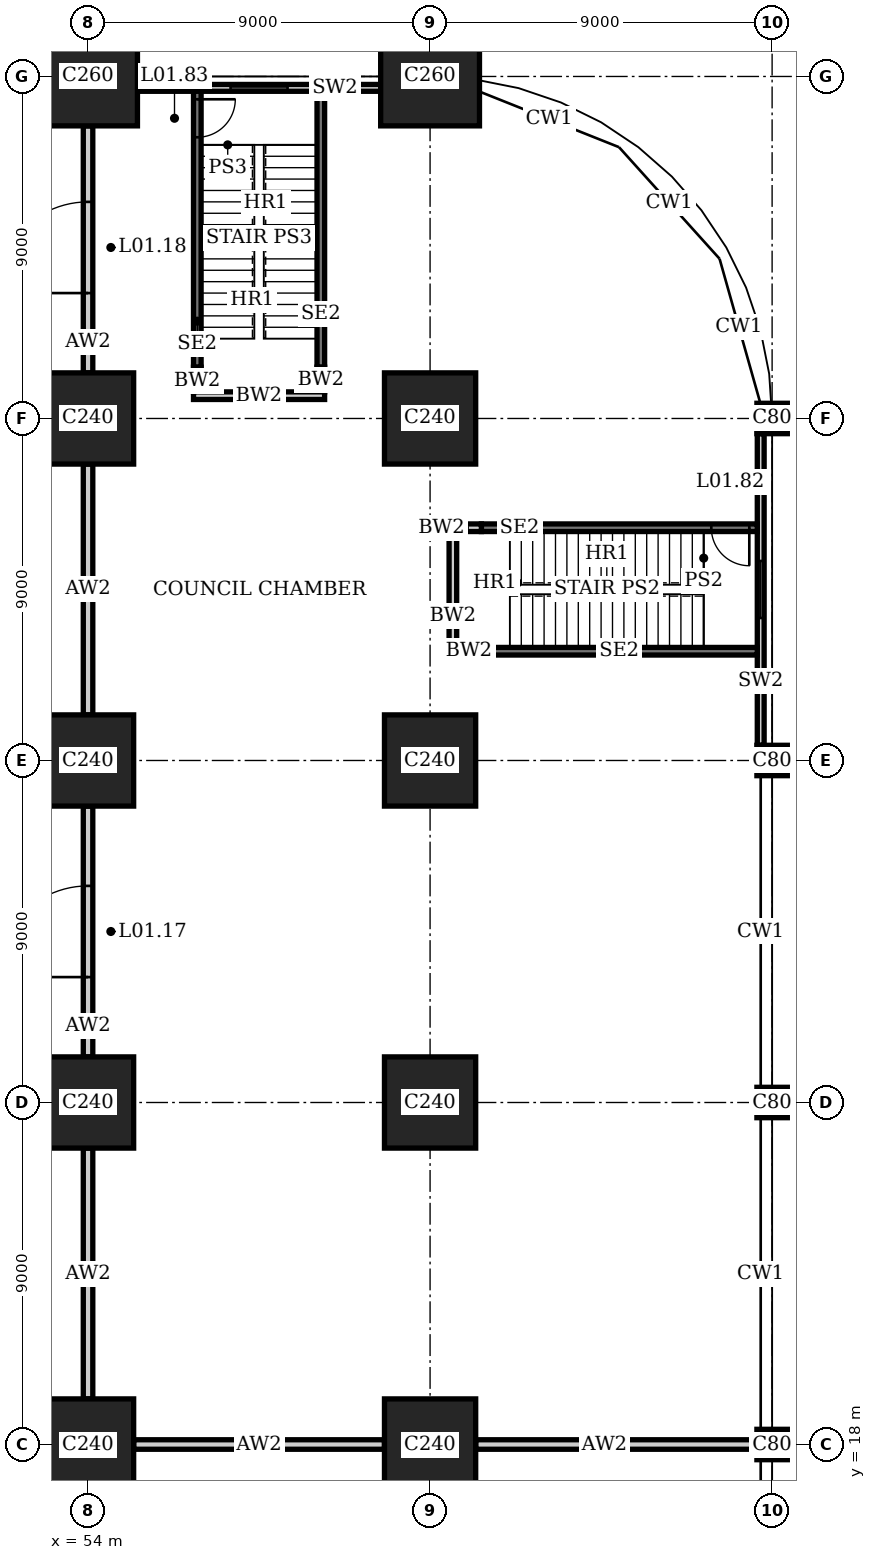
"""IFC4 building model, lengths in metres.
Left out: names, types, materials, properties, quantities, classifications, styles, units other than length and angle.
Written with IfcOpenShell. Run it as: python <this file> out.ifc"""

import sys

from ifc_helpers import new_model, si_unit, direction, frame, frame_2d, origin, origin_2d, place, context, subcontext, project, spatial, rectangle, extrude, element, fill, save


model = new_model("IFC4")
c1 = context("Model", 3, precision=1e-05, world=origin(), true_north=direction((0.0, 1.0)))
c2 = subcontext(c1, "Body", "Model", "MODEL_VIEW")
j1 = project(units=[si_unit("LENGTHUNIT", "METRE"), si_unit("PLANEANGLEUNIT", "RADIAN")], contexts=[c1])
p1 = place(None, origin())
s1 = spatial("IfcSite", under=j1, at=p1, CompositionType="ELEMENT")
p2 = place(p1, origin())
s2 = spatial("IfcBuilding", under=s1, at=p2, CompositionType="ELEMENT")
p3 = place(p2, frame((0.0, 0.0, 5.4)))
s3 = spatial("IfcBuildingStorey", under=s2, at=p3, CompositionType="ELEMENT", Elevation=5.4)
for number, where, z_axis, x_axis in (
    (1, (54.0, 18.0, 0.0), (0.0, 0.0, 1.0), (1.0, 0.0, 0.0)),
    (2, (54.0, 27.0, 0.0), (0.0, 0.0, 1.0), (1.0, 0.0, 0.0)),
    (3, (54.0, 36.0, 0.0), (0.0, 0.0, 1.0), (1.0, 0.0, 0.0)),
    (4, (54.0, 45.0, 0.0), (0.0, 0.0, 1.0), (1.0, 0.0, 0.0)),
):
    element("IfcColumn", number, at=place(p3, frame(where, z_axis=z_axis, x_axis=x_axis)), inside=s3, PredefinedType="COLUMN", context=c2, shape_type="SweptSolid", body=[
        extrude(rectangle(XDim=2.4, YDim=2.4, at=origin_2d()), origin(), (0.0, 0.0, 1.0), 5.4),
    ])
p4 = place(p3, frame((54.0, 54.0, 0.0), z_axis=(0.0, 0.0, 1.0), x_axis=(1.0, 0.0, 0.0)))
e5 = element("IfcColumn", 5, at=p4, inside=s3, PredefinedType="COLUMN", context=c2, shape_type="SweptSolid", body=[
    extrude(rectangle(XDim=2.6, YDim=2.6, at=origin_2d()), origin(), (0.0, 0.0, 1.0), 5.4),
])
for number, where, z_axis, x_axis in (
    (6, (63.0, 18.0, 0.0), (0.0, 0.0, 1.0), (1.0, 0.0, 0.0)),
    (7, (63.0, 27.0, 0.0), (0.0, 0.0, 1.0), (1.0, 0.0, 0.0)),
    (8, (63.0, 36.0, 0.0), (0.0, 0.0, 1.0), (1.0, 0.0, 0.0)),
    (9, (63.0, 45.0, 0.0), (0.0, 0.0, 1.0), (1.0, 0.0, 0.0)),
):
    element("IfcColumn", number, at=place(p3, frame(where, z_axis=z_axis, x_axis=x_axis)), inside=s3, PredefinedType="COLUMN", context=c2, shape_type="SweptSolid", body=[
        extrude(rectangle(XDim=2.4, YDim=2.4, at=origin_2d()), origin(), (0.0, 0.0, 1.0), 5.4),
    ])
p5 = place(p3, frame((63.0, 54.0, 0.0), z_axis=(0.0, 0.0, 1.0), x_axis=(1.0, 0.0, 0.0)))
e10 = element("IfcColumn", 10, at=p5, inside=s3, PredefinedType="COLUMN", context=c2, shape_type="SweptSolid", body=[
    extrude(rectangle(XDim=2.6, YDim=2.6, at=origin_2d()), origin(), (0.0, 0.0, 1.0), 5.4),
])
for number, where, z_axis, x_axis in (
    (11, (72.0, 18.0, 0.0), (0.0, 0.0, 1.0), (1.0, 0.0, 0.0)),
    (12, (72.0, 27.0, 0.0), (0.0, 0.0, 1.0), (1.0, 0.0, 0.0)),
    (13, (72.0, 36.0, 0.0), (0.0, 0.0, 1.0), (1.0, 0.0, 0.0)),
    (14, (72.0, 45.0, 0.0), (0.0, 0.0, 1.0), (1.0, 0.0, 0.0)),
):
    element("IfcColumn", number, at=place(p3, frame(where, z_axis=z_axis, x_axis=x_axis)), inside=s3, PredefinedType="COLUMN", context=c2, shape_type="SweptSolid", body=[
        extrude(rectangle(XDim=0.8, YDim=0.8, at=origin_2d()), origin(), (0.0, 0.0, 1.0), 5.4),
    ])
p6 = place(p3, frame((55.3, 53.7, 0.0), z_axis=(0.0, 0.0, 1.0), x_axis=(1.0, 0.0, 0.0)))
e15 = element("IfcWall", 15, at=p6, inside=s3, PredefinedType="SOLIDWALL", context=c2, shape_type="SweptSolid", body=[
    extrude(rectangle(XDim=6.4, YDim=0.18, at=frame_2d((3.2, 0.0))), origin(), (0.0, 0.0, 1.0), 4.3),
])
p7 = place(p6, frame((2.45, 0.0, 0.3)))
e16 = element("IfcOpeningElement", 16, at=p7, cuts=e15, PredefinedType="OPENING", context=c2, shape_type="SweptSolid", body=[
    extrude(rectangle(XDim=1.5, YDim=2.4, at=frame_2d((0.75, 1.2))), frame((0.0, 0.1, 0.0), z_axis=(0.0, -1.0, 0.0), x_axis=(1.0, 0.0, 0.0)), (0.0, 0.0, 1.0), 0.2),
])
p8 = place(p3, frame((71.7, 36.4, 0.0), z_axis=(0.0, 0.0, 1.0), x_axis=(0.0, 1.0, 0.0)))
e17 = element("IfcWall", 17, at=p8, inside=s3, PredefinedType="SOLIDWALL", context=c2, shape_type="SweptSolid", body=[
    extrude(rectangle(XDim=8.2, YDim=0.18, at=frame_2d((4.1, 0.0))), origin(), (0.0, 0.0, 1.0), 4.3),
])
p9 = place(p8, frame((3.35, 0.0, 0.3)))
e18 = element("IfcOpeningElement", 18, at=p9, cuts=e17, PredefinedType="OPENING", context=c2, shape_type="SweptSolid", body=[
    extrude(rectangle(XDim=1.5, YDim=2.4, at=frame_2d((0.75, 1.2))), frame((0.0, 0.1, 0.0), z_axis=(0.0, -1.0, 0.0), x_axis=(1.0, 0.0, 0.0)), (0.0, 0.0, 1.0), 0.2),
])
p10 = place(p3, frame((54.0, 19.2, 0.0), z_axis=(0.0, 0.0, 1.0), x_axis=(0.0, 1.0, 0.0)))
e19 = element("IfcWall", 19, at=p10, inside=s3, PredefinedType="PARTITIONING", context=c2, shape_type="SweptSolid", body=[
    extrude(rectangle(XDim=6.6, YDim=0.25, at=frame_2d((3.3, 0.0))), origin(), (0.0, 0.0, 1.0), 4.3),
])
p11 = place(p3, frame((54.0, 28.2, 0.0), z_axis=(0.0, 0.0, 1.0), x_axis=(0.0, 1.0, 0.0)))
e20 = element("IfcWall", 20, at=p11, inside=s3, PredefinedType="PARTITIONING", context=c2, shape_type="SweptSolid", body=[
    extrude(rectangle(XDim=6.6, YDim=0.25, at=frame_2d((3.3, 0.0))), origin(), (0.0, 0.0, 1.0), 4.3),
])
p12 = place(p11, frame((2.1, 0.0, 0.0)))
e21 = element("IfcOpeningElement", 21, at=p12, cuts=e20, PredefinedType="OPENING", context=c2, shape_type="SweptSolid", body=[
    extrude(rectangle(XDim=2.4, YDim=3.0, at=frame_2d((1.2, 1.5))), frame((0.0, 0.135, 0.0), z_axis=(0.0, -1.0, 0.0), x_axis=(1.0, 0.0, 0.0)), (0.0, 0.0, 1.0), 0.27),
])
p13 = place(p3, frame((54.0, 37.2, 0.0), z_axis=(0.0, 0.0, 1.0), x_axis=(0.0, 1.0, 0.0)))
e22 = element("IfcWall", 22, at=p13, inside=s3, PredefinedType="PARTITIONING", context=c2, shape_type="SweptSolid", body=[
    extrude(rectangle(XDim=6.6, YDim=0.25, at=frame_2d((3.3, 0.0))), origin(), (0.0, 0.0, 1.0), 4.3),
])
p14 = place(p3, frame((54.0, 46.2, 0.0), z_axis=(0.0, 0.0, 1.0), x_axis=(0.0, 1.0, 0.0)))
e23 = element("IfcWall", 23, at=p14, inside=s3, PredefinedType="PARTITIONING", context=c2, shape_type="SweptSolid", body=[
    extrude(rectangle(XDim=6.5, YDim=0.25, at=frame_2d((3.25, 0.0))), origin(), (0.0, 0.0, 1.0), 4.3),
])
p15 = place(p14, frame((2.1, 0.0, 0.0)))
e24 = element("IfcOpeningElement", 24, at=p15, cuts=e23, PredefinedType="OPENING", context=c2, shape_type="SweptSolid", body=[
    extrude(rectangle(XDim=2.4, YDim=3.0, at=frame_2d((1.2, 1.5))), frame((0.0, 0.135, 0.0), z_axis=(0.0, -1.0, 0.0), x_axis=(1.0, 0.0, 0.0)), (0.0, 0.0, 1.0), 0.27),
])
p16 = place(p3, frame((55.2, 18.0, 0.0), z_axis=(0.0, 0.0, 1.0), x_axis=(1.0, 0.0, 0.0)))
e25 = element("IfcWall", 25, at=p16, inside=s3, PredefinedType="PARTITIONING", context=c2, shape_type="SweptSolid", body=[
    extrude(rectangle(XDim=6.6, YDim=0.25, at=frame_2d((3.3, 0.0))), origin(), (0.0, 0.0, 1.0), 4.3),
])
p17 = place(p3, frame((64.2, 18.0, 0.0), z_axis=(0.0, 0.0, 1.0), x_axis=(1.0, 0.0, 0.0)))
e26 = element("IfcWall", 26, at=p17, inside=s3, PredefinedType="PARTITIONING", context=c2, shape_type="SweptSolid", body=[
    extrude(rectangle(XDim=7.4, YDim=0.25, at=frame_2d((3.7, 0.0))), origin(), (0.0, 0.0, 1.0), 4.3),
])
p18 = place(p3, frame((71.61, 42.125, 0.0), z_axis=(0.0, 0.0, 1.0), x_axis=(-1.0, 0.0, 0.0)))
e27 = element("IfcWall", 27, at=p18, inside=s3, PredefinedType="SOLIDWALL", context=c2, shape_type="SweptSolid", body=[
    extrude(rectangle(XDim=7.26, YDim=0.2, at=frame_2d((3.63, 0.0))), origin(), (0.0, 0.0, 1.0), 5.4),
])
p19 = place(p18, frame((0.21, 0.0, 0.0)))
e28 = element("IfcOpeningElement", 28, at=p19, cuts=e27, PredefinedType="OPENING", context=c2, shape_type="SweptSolid", body=[
    extrude(rectangle(XDim=1.0, YDim=2.4, at=frame_2d((0.5, 1.2))), frame((0.0, 0.11, 0.0), z_axis=(0.0, -1.0, 0.0), x_axis=(1.0, 0.0, 0.0)), (0.0, 0.0, 1.0), 0.22),
])
p20 = place(p3, frame((71.61, 38.875, 0.0), z_axis=(0.0, 0.0, 1.0), x_axis=(-1.0, 0.0, 0.0)))
e29 = element("IfcWall", 29, at=p20, inside=s3, PredefinedType="SOLIDWALL", context=c2, shape_type="SweptSolid", body=[
    extrude(rectangle(XDim=7.26, YDim=0.2, at=frame_2d((3.63, 0.0))), origin(), (0.0, 0.0, 1.0), 5.4),
])
for number, where, z_axis, x_axis in (
    (30, (64.35, 42.125, 0.0), (0.0, 0.0, 1.0), (-1.0, 0.0, 0.0)),
    (31, (64.35, 38.875, 0.0), (0.0, 0.0, 1.0), (-1.0, 0.0, 0.0)),
):
    element("IfcWall", number, at=place(p3, frame(where, z_axis=z_axis, x_axis=x_axis)), inside=s3, PredefinedType="SOLIDWALL", context=c2, shape_type="SweptSolid", body=[
        extrude(rectangle(XDim=0.65, YDim=0.2, at=frame_2d((0.325, 0.0))), origin(), (0.0, 0.0, 1.0), 5.4),
    ])
p21 = place(p3, frame((63.6, 42.225, 0.0), z_axis=(0.0, 0.0, 1.0), x_axis=(0.0, -1.0, 0.0)))
e32 = element("IfcWall", 32, at=p21, inside=s3, PredefinedType="SOLIDWALL", context=c2, shape_type="SweptSolid", body=[
    extrude(rectangle(XDim=3.45, YDim=0.2, at=frame_2d((1.725, 0.0))), origin(), (0.0, 0.0, 1.0), 4.3),
])
p22 = place(p3, frame((56.875, 53.61, 0.0), z_axis=(0.0, 0.0, 1.0), x_axis=(0.0, -1.0, 0.0)))
e33 = element("IfcWall", 33, at=p22, inside=s3, PredefinedType="SOLIDWALL", context=c2, shape_type="SweptSolid", body=[
    extrude(rectangle(XDim=7.26, YDim=0.2, at=frame_2d((3.63, 0.0))), origin(), (0.0, 0.0, 1.0), 5.4),
])
p23 = place(p22, frame((0.21, 0.0, 0.0)))
e34 = element("IfcOpeningElement", 34, at=p23, cuts=e33, PredefinedType="OPENING", context=c2, shape_type="SweptSolid", body=[
    extrude(rectangle(XDim=1.0, YDim=2.4, at=frame_2d((0.5, 1.2))), frame((0.0, 0.11, 0.0), z_axis=(0.0, -1.0, 0.0), x_axis=(1.0, 0.0, 0.0)), (0.0, 0.0, 1.0), 0.22),
])
p24 = place(p3, frame((60.125, 53.61, 0.0), z_axis=(0.0, 0.0, 1.0), x_axis=(0.0, -1.0, 0.0)))
e35 = element("IfcWall", 35, at=p24, inside=s3, PredefinedType="SOLIDWALL", context=c2, shape_type="SweptSolid", body=[
    extrude(rectangle(XDim=7.26, YDim=0.2, at=frame_2d((3.63, 0.0))), origin(), (0.0, 0.0, 1.0), 5.4),
])
for number, where, z_axis, x_axis in (
    (36, (56.875, 46.35, 0.0), (0.0, 0.0, 1.0), (0.0, -1.0, 0.0)),
    (37, (60.125, 46.35, 0.0), (0.0, 0.0, 1.0), (0.0, -1.0, 0.0)),
):
    element("IfcWall", number, at=place(p3, frame(where, z_axis=z_axis, x_axis=x_axis)), inside=s3, PredefinedType="SOLIDWALL", context=c2, shape_type="SweptSolid", body=[
        extrude(rectangle(XDim=0.65, YDim=0.2, at=frame_2d((0.325, 0.0))), origin(), (0.0, 0.0, 1.0), 5.4),
    ])
p25 = place(p3, frame((56.775, 45.6, 0.0), z_axis=(0.0, 0.0, 1.0), x_axis=(1.0, 0.0, 0.0)))
e38 = element("IfcWall", 38, at=p25, inside=s3, PredefinedType="SOLIDWALL", context=c2, shape_type="SweptSolid", body=[
    extrude(rectangle(XDim=3.45, YDim=0.2, at=frame_2d((1.725, 0.0))), origin(), (0.0, 0.0, 1.0), 5.1),
])
p26 = place(p7, origin())
e39 = element("IfcWindow", 39, at=p26, inside=s3, PartitioningType="SINGLE_PANEL", PredefinedType="WINDOW", context=c2, shape_type="SweptSolid", body=[
    extrude(rectangle(XDim=1.5, YDim=2.4, at=frame_2d((0.75, 1.2))), frame((0.0, 0.03, 0.0), z_axis=(0.0, -1.0, 0.0), x_axis=(1.0, 0.0, 0.0)), (0.0, 0.0, 1.0), 0.06),
])
fill(e16, e39)
p27 = place(p9, origin())
e40 = element("IfcWindow", 40, at=p27, inside=s3, PartitioningType="SINGLE_PANEL", PredefinedType="WINDOW", context=c2, shape_type="SweptSolid", body=[
    extrude(rectangle(XDim=1.5, YDim=2.4, at=frame_2d((0.75, 1.2))), frame((0.0, 0.03, 0.0), z_axis=(0.0, -1.0, 0.0), x_axis=(1.0, 0.0, 0.0)), (0.0, 0.0, 1.0), 0.06),
])
fill(e18, e40)
p28 = place(p12, origin())
e41 = element("IfcDoor", 41, at=p28, inside=s3, OperationType="DOUBLE_DOOR_DOUBLE_SWING", PredefinedType="DOOR", context=c2, shape_type="SweptSolid", body=[
    extrude(rectangle(XDim=2.4, YDim=3.0, at=frame_2d((1.2, 1.5))), frame((0.0, 0.03, 0.0), z_axis=(0.0, -1.0, 0.0), x_axis=(1.0, 0.0, 0.0)), (0.0, 0.0, 1.0), 0.06),
])
fill(e21, e41)
p29 = place(p15, origin())
e42 = element("IfcDoor", 42, at=p29, inside=s3, OperationType="DOUBLE_DOOR_DOUBLE_SWING", PredefinedType="DOOR", context=c2, shape_type="SweptSolid", body=[
    extrude(rectangle(XDim=2.4, YDim=3.0, at=frame_2d((1.2, 1.5))), frame((0.0, 0.03, 0.0), z_axis=(0.0, -1.0, 0.0), x_axis=(1.0, 0.0, 0.0)), (0.0, 0.0, 1.0), 0.06),
])
fill(e24, e42)
p30 = place(p19, origin())
e43 = element("IfcDoor", 43, at=p30, inside=s3, OperationType="SINGLE_SWING_RIGHT", PredefinedType="DOOR", context=c2, shape_type="SweptSolid", body=[
    extrude(rectangle(XDim=1.0, YDim=2.4, at=frame_2d((0.5, 1.2))), frame((0.0, 0.03, 0.0), z_axis=(0.0, -1.0, 0.0), x_axis=(1.0, 0.0, 0.0)), (0.0, 0.0, 1.0), 0.06),
])
fill(e28, e43)
p31 = place(p23, origin())
e44 = element("IfcDoor", 44, at=p31, inside=s3, OperationType="SINGLE_SWING_RIGHT", PredefinedType="DOOR", context=c2, shape_type="SweptSolid", body=[
    extrude(rectangle(XDim=1.0, YDim=2.4, at=frame_2d((0.5, 1.2))), frame((0.0, 0.03, 0.0), z_axis=(0.0, -1.0, 0.0), x_axis=(1.0, 0.0, 0.0)), (0.0, 0.0, 1.0), 0.06),
])
fill(e34, e44)
save(model, sys.argv[1])
